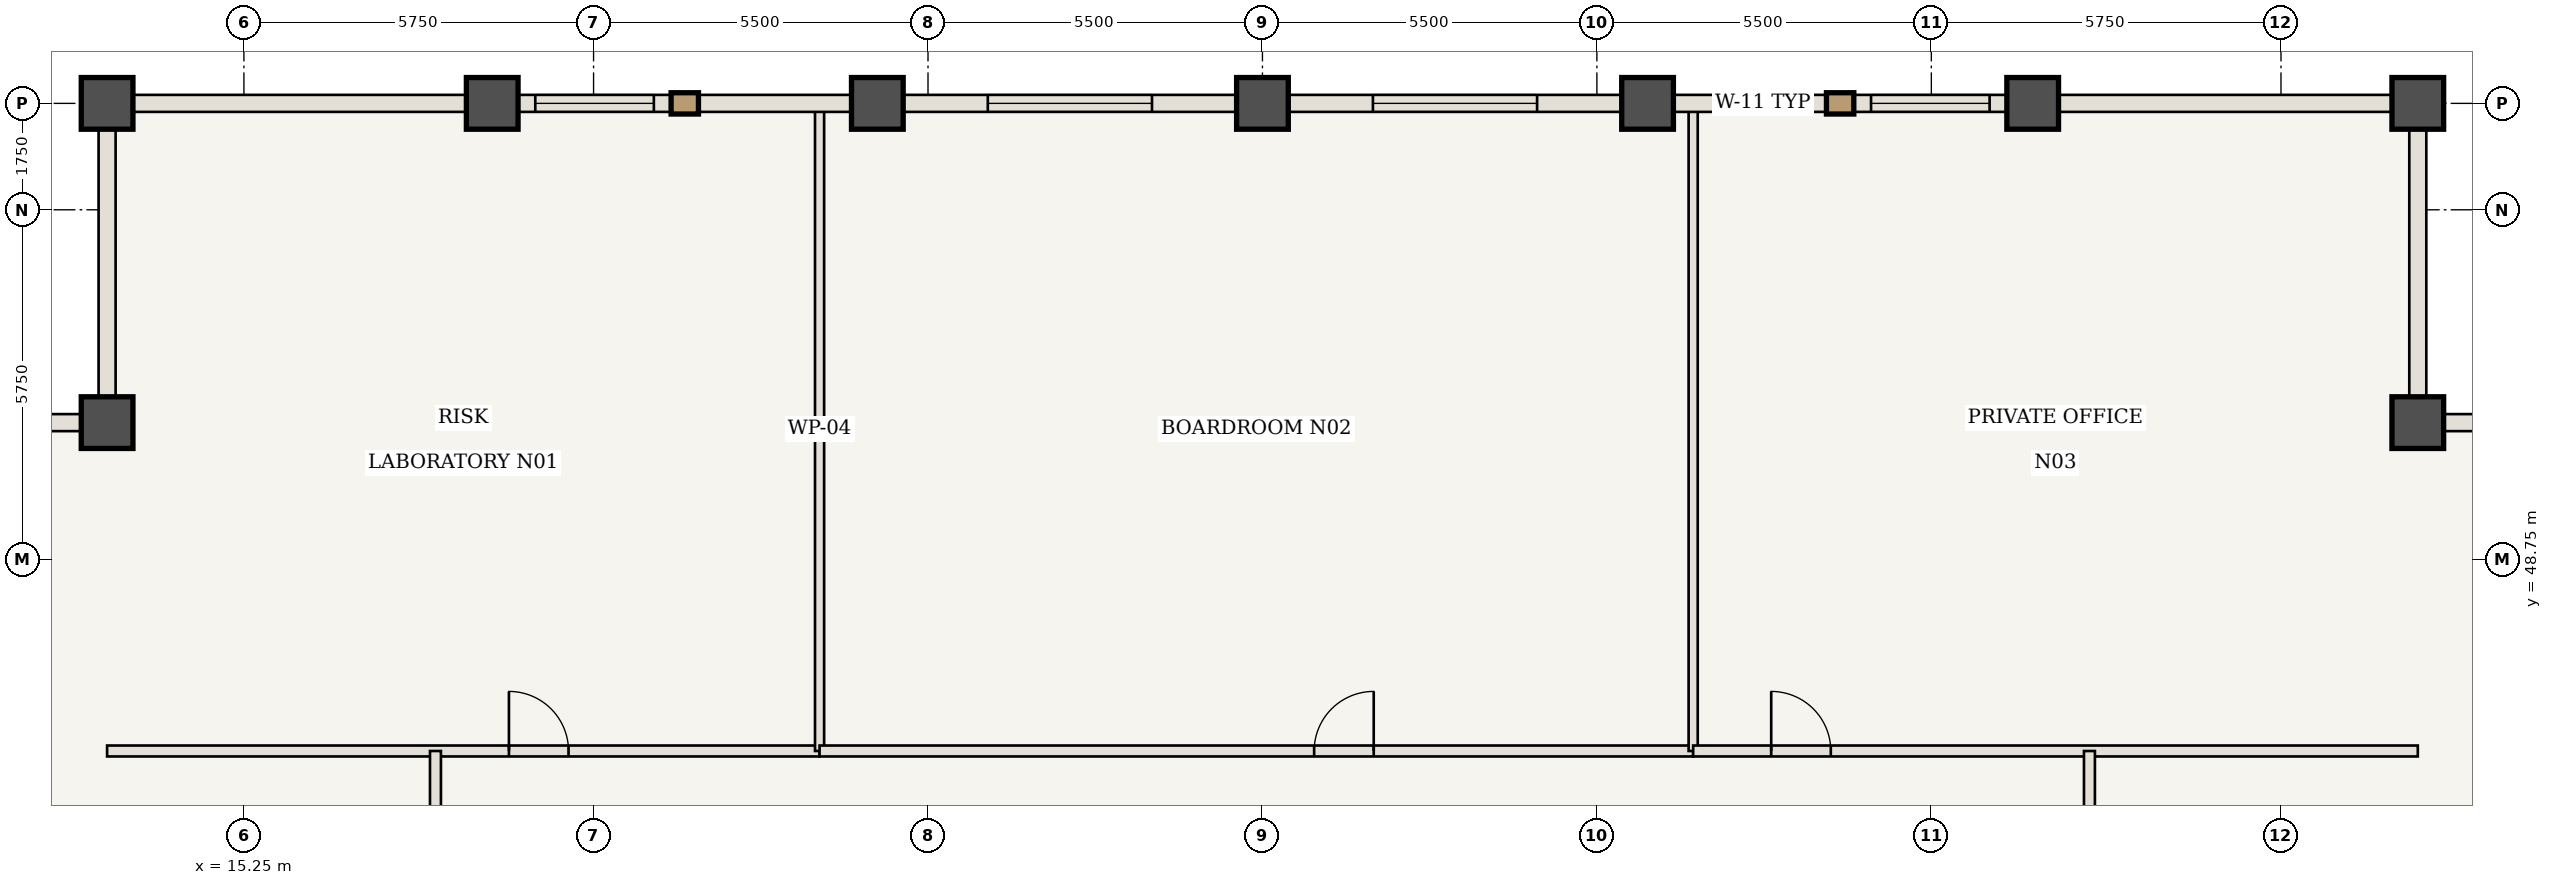
"""IFC4 building model, lengths in metres.
Left out: names, types, materials, properties, quantities, classifications, styles, units other than length and angle.
Written with IfcOpenShell. Run it as: python <this file> out.ifc"""

import sys

from ifc_helpers import new_model, si_unit, direction, frame, frame_2d, origin, origin_2d, place, context, subcontext, project, spatial, rectangle, extrude, element, fill, save


model = new_model("IFC4")
c1 = context("Model", 3, precision=1e-05, world=origin(), true_north=direction((0.0, 1.0)))
c2 = subcontext(c1, "Body", "Model", "MODEL_VIEW")
j1 = project(units=[si_unit("LENGTHUNIT", "METRE"), si_unit("PLANEANGLEUNIT", "RADIAN")], contexts=[c1])
p1 = place(None, origin())
s1 = spatial("IfcSite", under=j1, at=p1, CompositionType="ELEMENT")
p2 = place(p1, origin())
s2 = spatial("IfcBuilding", under=s1, at=p2, CompositionType="ELEMENT")
p3 = place(p2, frame((0.0, 0.0, 190.75)))
s3 = spatial("IfcBuildingStorey", under=s2, at=p3, CompositionType="ELEMENT", Elevation=190.75)
for number, where, z_axis, x_axis in (
    (1, (51.0, 51.0, 0.0), (0.0, 0.0, 1.0), (1.0, 0.0, 0.0)),
    (2, (51.0, 56.25, 0.0), (0.0, 0.0, 1.0), (1.0, 0.0, 0.0)),
    (3, (13.0, 56.25, 0.0), (0.0, 0.0, 1.0), (1.0, 0.0, 0.0)),
    (4, (13.0, 51.0, 0.0), (0.0, 0.0, 1.0), (1.0, 0.0, 0.0)),
    (5, (19.333, 56.25, 0.0), (0.0, 0.0, 1.0), (1.0, 0.0, 0.0)),
    (6, (25.667, 56.25, 0.0), (0.0, 0.0, 1.0), (1.0, 0.0, 0.0)),
    (7, (32.0, 56.25, 0.0), (0.0, 0.0, 1.0), (1.0, 0.0, 0.0)),
    (8, (38.333, 56.25, 0.0), (0.0, 0.0, 1.0), (1.0, 0.0, 0.0)),
    (9, (44.667, 56.25, 0.0), (0.0, 0.0, 1.0), (1.0, 0.0, 0.0)),
):
    element("IfcColumn", number, at=place(p3, frame(where, z_axis=z_axis, x_axis=x_axis)), inside=s3, PredefinedType="COLUMN", context=c2, shape_type="SweptSolid", body=[
        extrude(rectangle(XDim=0.85, YDim=0.85, at=origin_2d()), origin(), (0.0, 0.0, 1.0), 3.85),
    ])
p4 = place(p3, frame((13.0, 45.6, 0.0), z_axis=(0.0, 0.0, 1.0), x_axis=(1.0, 0.0, 0.0)))
e10 = element("IfcWall", 10, at=p4, inside=s3, PredefinedType="STANDARD", context=c2, shape_type="SweptSolid", body=[
    extrude(rectangle(XDim=11.717, YDim=0.18, at=frame_2d((5.858, 0.0))), origin(), (0.0, 0.0, 1.0), 3.685),
])
p5 = place(p4, frame((6.608, 0.0, 0.0)))
e11 = element("IfcOpeningElement", 11, at=p5, cuts=e10, PredefinedType="OPENING", context=c2, shape_type="SweptSolid", body=[
    extrude(rectangle(XDim=0.98, YDim=2.2, at=frame_2d((0.49, 1.1))), frame((0.0, 0.1, 0.0), z_axis=(0.0, -1.0, 0.0), x_axis=(1.0, 0.0, 0.0)), (0.0, 0.0, 1.0), 0.2),
])
p6 = place(p3, frame((24.717, 45.6, 0.0), z_axis=(0.0, 0.0, 1.0), x_axis=(0.0, 1.0, 0.0)))
e12 = element("IfcWall", 12, at=p6, inside=s3, PredefinedType="STANDARD", context=c2, shape_type="SweptSolid", body=[
    extrude(rectangle(XDim=10.59, YDim=0.15, at=frame_2d((5.295, 0.0))), origin(), (0.0, 0.0, 1.0), 3.685),
])
p7 = place(p3, frame((24.717, 45.6, 0.0), z_axis=(0.0, 0.0, 1.0), x_axis=(1.0, 0.0, 0.0)))
e13 = element("IfcWall", 13, at=p7, inside=s3, PredefinedType="STANDARD", context=c2, shape_type="SweptSolid", body=[
    extrude(rectangle(XDim=14.366, YDim=0.18, at=frame_2d((7.183, 0.0))), origin(), (0.0, 0.0, 1.0), 3.685),
])
p8 = place(p7, frame((8.133, 0.0, 0.0)))
e14 = element("IfcOpeningElement", 14, at=p8, cuts=e13, PredefinedType="OPENING", context=c2, shape_type="SweptSolid", body=[
    extrude(rectangle(XDim=0.98, YDim=2.2, at=frame_2d((0.49, 1.1))), frame((0.0, 0.1, 0.0), z_axis=(0.0, -1.0, 0.0), x_axis=(1.0, 0.0, 0.0)), (0.0, 0.0, 1.0), 0.2),
])
p9 = place(p3, frame((39.083, 45.6, 0.0), z_axis=(0.0, 0.0, 1.0), x_axis=(0.0, 1.0, 0.0)))
e15 = element("IfcWall", 15, at=p9, inside=s3, PredefinedType="STANDARD", context=c2, shape_type="SweptSolid", body=[
    extrude(rectangle(XDim=10.59, YDim=0.15, at=frame_2d((5.295, 0.0))), origin(), (0.0, 0.0, 1.0), 3.685),
])
p10 = place(p3, frame((39.083, 45.6, 0.0), z_axis=(0.0, 0.0, 1.0), x_axis=(1.0, 0.0, 0.0)))
e16 = element("IfcWall", 16, at=p10, inside=s3, PredefinedType="STANDARD", context=c2, shape_type="SweptSolid", body=[
    extrude(rectangle(XDim=11.917, YDim=0.18, at=frame_2d((5.958, 0.0))), origin(), (0.0, 0.0, 1.0), 3.685),
])
p11 = place(p10, frame((1.283, 0.0, 0.0)))
e17 = element("IfcOpeningElement", 17, at=p11, cuts=e16, PredefinedType="OPENING", context=c2, shape_type="SweptSolid", body=[
    extrude(rectangle(XDim=0.98, YDim=2.2, at=frame_2d((0.49, 1.1))), frame((0.0, 0.1, 0.0), z_axis=(0.0, -1.0, 0.0), x_axis=(1.0, 0.0, 0.0)), (0.0, 0.0, 1.0), 0.2),
])
p12 = place(p3, frame((18.4, 37.833, 0.0), z_axis=(0.0, 0.0, 1.0), x_axis=(0.0, 1.0, 0.0)))
e18 = element("IfcWall", 18, at=p12, inside=s3, PredefinedType="STANDARD", context=c2, shape_type="SweptSolid", body=[
    extrude(rectangle(XDim=7.767, YDim=0.18, at=frame_2d((3.883, 0.0))), origin(), (0.0, 0.0, 1.0), 3.685),
])
p13 = place(p12, frame((3.383, 0.0, 0.0)))
e19 = element("IfcOpeningElement", 19, at=p13, cuts=e18, PredefinedType="OPENING", context=c2, shape_type="SweptSolid", body=[
    extrude(rectangle(XDim=0.98, YDim=2.2, at=frame_2d((0.49, 1.1))), frame((0.0, 0.1, 0.0), z_axis=(0.0, -1.0, 0.0), x_axis=(1.0, 0.0, 0.0)), (0.0, 0.0, 1.0), 0.2),
])
p14 = place(p3, frame((45.6, 31.8, 0.0), z_axis=(0.0, 0.0, 1.0), x_axis=(0.0, 1.0, 0.0)))
e20 = element("IfcWall", 20, at=p14, inside=s3, PredefinedType="STANDARD", context=c2, shape_type="SweptSolid", body=[
    extrude(rectangle(XDim=13.8, YDim=0.18, at=frame_2d((6.9, 0.0))), origin(), (0.0, 0.0, 1.0), 3.685),
])
p15 = place(p14, frame((6.4, 0.0, 0.0)))
e21 = element("IfcOpeningElement", 21, at=p15, cuts=e20, PredefinedType="OPENING", context=c2, shape_type="SweptSolid", body=[
    extrude(rectangle(XDim=0.98, YDim=2.2, at=frame_2d((0.49, 1.1))), frame((0.0, 0.1, 0.0), z_axis=(0.0, -1.0, 0.0), x_axis=(1.0, 0.0, 0.0)), (0.0, 0.0, 1.0), 0.2),
])
p16 = place(p3, frame((13.0, 56.25, 0.0), z_axis=(0.0, 0.0, 1.0), x_axis=(1.0, 0.0, 0.0)))
e22 = element("IfcWall", 22, at=p16, inside=s3, PredefinedType="USERDEFINED", context=c2, shape_type="SweptSolid", body=[
    extrude(rectangle(XDim=6.333, YDim=0.28, at=frame_2d((3.167, 0.0))), origin(), (0.0, 0.0, 1.0), 2.985),
])
p17 = place(p3, frame((19.333, 56.25, 0.0), z_axis=(0.0, 0.0, 1.0), x_axis=(1.0, 0.0, 0.0)))
e23 = element("IfcWall", 23, at=p17, inside=s3, PredefinedType="USERDEFINED", context=c2, shape_type="SweptSolid", body=[
    extrude(rectangle(XDim=6.333, YDim=0.28, at=frame_2d((3.167, 0.0))), origin(), (0.0, 0.0, 1.0), 2.985),
])
p18 = place(p17, frame((0.708, 0.0, 0.85)))
e24 = element("IfcOpeningElement", 24, at=p18, cuts=e23, PredefinedType="OPENING", context=c2, shape_type="SweptSolid", body=[
    extrude(rectangle(XDim=1.95, YDim=1.935, at=frame_2d((0.975, 0.968))), frame((0.0, 0.15, 0.0), z_axis=(0.0, -1.0, 0.0), x_axis=(1.0, 0.0, 0.0)), (0.0, 0.0, 1.0), 0.3),
])
p19 = place(p3, frame((25.667, 56.25, 0.0), z_axis=(0.0, 0.0, 1.0), x_axis=(1.0, 0.0, 0.0)))
e25 = element("IfcWall", 25, at=p19, inside=s3, PredefinedType="USERDEFINED", context=c2, shape_type="SweptSolid", body=[
    extrude(rectangle(XDim=6.333, YDim=0.28, at=frame_2d((3.167, 0.0))), origin(), (0.0, 0.0, 1.0), 2.985),
])
p20 = place(p19, frame((1.817, 0.0, 0.85)))
e26 = element("IfcOpeningElement", 26, at=p20, cuts=e25, PredefinedType="OPENING", context=c2, shape_type="SweptSolid", body=[
    extrude(rectangle(XDim=2.7, YDim=1.935, at=frame_2d((1.35, 0.968))), frame((0.0, 0.15, 0.0), z_axis=(0.0, -1.0, 0.0), x_axis=(1.0, 0.0, 0.0)), (0.0, 0.0, 1.0), 0.3),
])
p21 = place(p3, frame((32.0, 56.25, 0.0), z_axis=(0.0, 0.0, 1.0), x_axis=(1.0, 0.0, 0.0)))
e27 = element("IfcWall", 27, at=p21, inside=s3, PredefinedType="USERDEFINED", context=c2, shape_type="SweptSolid", body=[
    extrude(rectangle(XDim=6.333, YDim=0.28, at=frame_2d((3.167, 0.0))), origin(), (0.0, 0.0, 1.0), 2.985),
])
p22 = place(p21, frame((1.817, 0.0, 0.85)))
e28 = element("IfcOpeningElement", 28, at=p22, cuts=e27, PredefinedType="OPENING", context=c2, shape_type="SweptSolid", body=[
    extrude(rectangle(XDim=2.7, YDim=1.935, at=frame_2d((1.35, 0.968))), frame((0.0, 0.15, 0.0), z_axis=(0.0, -1.0, 0.0), x_axis=(1.0, 0.0, 0.0)), (0.0, 0.0, 1.0), 0.3),
])
p23 = place(p3, frame((38.333, 56.25, 0.0), z_axis=(0.0, 0.0, 1.0), x_axis=(1.0, 0.0, 0.0)))
e29 = element("IfcWall", 29, at=p23, inside=s3, PredefinedType="USERDEFINED", context=c2, shape_type="SweptSolid", body=[
    extrude(rectangle(XDim=6.333, YDim=0.28, at=frame_2d((3.167, 0.0))), origin(), (0.0, 0.0, 1.0), 2.985),
])
p24 = place(p23, frame((1.096, 0.0, 0.85)))
e30 = element("IfcOpeningElement", 30, at=p24, cuts=e29, PredefinedType="OPENING", context=c2, shape_type="SweptSolid", body=[
    extrude(rectangle(XDim=1.6, YDim=1.935, at=frame_2d((0.8, 0.968))), frame((0.0, 0.15, 0.0), z_axis=(0.0, -1.0, 0.0), x_axis=(1.0, 0.0, 0.0)), (0.0, 0.0, 1.0), 0.3),
])
p25 = place(p23, frame((3.675, 0.0, 0.85)))
e31 = element("IfcOpeningElement", 31, at=p25, cuts=e29, PredefinedType="OPENING", context=c2, shape_type="SweptSolid", body=[
    extrude(rectangle(XDim=1.95, YDim=1.935, at=frame_2d((0.975, 0.968))), frame((0.0, 0.15, 0.0), z_axis=(0.0, -1.0, 0.0), x_axis=(1.0, 0.0, 0.0)), (0.0, 0.0, 1.0), 0.3),
])
p26 = place(p3, frame((44.667, 56.25, 0.0), z_axis=(0.0, 0.0, 1.0), x_axis=(1.0, 0.0, 0.0)))
e32 = element("IfcWall", 32, at=p26, inside=s3, PredefinedType="USERDEFINED", context=c2, shape_type="SweptSolid", body=[
    extrude(rectangle(XDim=6.333, YDim=0.28, at=frame_2d((3.167, 0.0))), origin(), (0.0, 0.0, 1.0), 2.985),
])
for number, where, z_axis, x_axis in (
    (33, (51.0, 51.0, 0.0), (0.0, 0.0, 1.0), (1.0, 0.0, 0.0)),
    (34, (51.0, 56.25, 0.0), (0.0, 0.0, 1.0), (0.0, -1.0, 0.0)),
    (35, (13.0, 51.0, 0.0), (0.0, 0.0, 1.0), (0.0, 1.0, 0.0)),
    (36, (7.75, 51.0, 0.0), (0.0, 0.0, 1.0), (1.0, 0.0, 0.0)),
):
    element("IfcWall", number, at=place(p3, frame(where, z_axis=z_axis, x_axis=x_axis)), inside=s3, PredefinedType="USERDEFINED", context=c2, shape_type="SweptSolid", body=[
        extrude(rectangle(XDim=5.25, YDim=0.28, at=frame_2d((2.625, 0.0))), origin(), (0.0, 0.0, 1.0), 2.985),
    ])
p27 = place(p5, origin())
e37 = element("IfcDoor", 37, at=p27, inside=s3, OperationType="SINGLE_SWING_LEFT", PredefinedType="DOOR", context=c2, shape_type="SweptSolid", body=[
    extrude(rectangle(XDim=0.98, YDim=2.2, at=frame_2d((0.49, 1.1))), frame((0.0, 0.025, 0.0), z_axis=(0.0, -1.0, 0.0), x_axis=(1.0, 0.0, 0.0)), (0.0, 0.0, 1.0), 0.05),
])
fill(e11, e37)
p28 = place(p8, origin())
e38 = element("IfcDoor", 38, at=p28, inside=s3, OperationType="SINGLE_SWING_RIGHT", PredefinedType="DOOR", context=c2, shape_type="SweptSolid", body=[
    extrude(rectangle(XDim=0.98, YDim=2.2, at=frame_2d((0.49, 1.1))), frame((0.0, 0.025, 0.0), z_axis=(0.0, -1.0, 0.0), x_axis=(1.0, 0.0, 0.0)), (0.0, 0.0, 1.0), 0.05),
])
fill(e14, e38)
p29 = place(p11, origin())
e39 = element("IfcDoor", 39, at=p29, inside=s3, OperationType="SINGLE_SWING_LEFT", PredefinedType="DOOR", context=c2, shape_type="SweptSolid", body=[
    extrude(rectangle(XDim=0.98, YDim=2.2, at=frame_2d((0.49, 1.1))), frame((0.0, 0.025, 0.0), z_axis=(0.0, -1.0, 0.0), x_axis=(1.0, 0.0, 0.0)), (0.0, 0.0, 1.0), 0.05),
])
fill(e17, e39)
p30 = place(p18, origin())
e40 = element("IfcWindow", 40, at=p30, inside=s3, PartitioningType="SINGLE_PANEL", PredefinedType="WINDOW", context=c2, shape_type="SweptSolid", body=[
    extrude(rectangle(XDim=1.95, YDim=1.935, at=frame_2d((0.975, 0.968))), frame((0.0, 0.03, 0.0), z_axis=(0.0, -1.0, 0.0), x_axis=(1.0, 0.0, 0.0)), (0.0, 0.0, 1.0), 0.06),
])
fill(e24, e40)
p31 = place(p20, origin())
e41 = element("IfcWindow", 41, at=p31, inside=s3, PartitioningType="SINGLE_PANEL", PredefinedType="WINDOW", context=c2, shape_type="SweptSolid", body=[
    extrude(rectangle(XDim=2.7, YDim=1.935, at=frame_2d((1.35, 0.968))), frame((0.0, 0.03, 0.0), z_axis=(0.0, -1.0, 0.0), x_axis=(1.0, 0.0, 0.0)), (0.0, 0.0, 1.0), 0.06),
])
fill(e26, e41)
p32 = place(p22, origin())
e42 = element("IfcWindow", 42, at=p32, inside=s3, PartitioningType="SINGLE_PANEL", PredefinedType="WINDOW", context=c2, shape_type="SweptSolid", body=[
    extrude(rectangle(XDim=2.7, YDim=1.935, at=frame_2d((1.35, 0.968))), frame((0.0, 0.03, 0.0), z_axis=(0.0, -1.0, 0.0), x_axis=(1.0, 0.0, 0.0)), (0.0, 0.0, 1.0), 0.06),
])
fill(e28, e42)
p33 = place(p24, origin())
e43 = element("IfcWindow", 43, at=p33, inside=s3, PartitioningType="SINGLE_PANEL", PredefinedType="WINDOW", context=c2, shape_type="SweptSolid", body=[
    extrude(rectangle(XDim=1.6, YDim=1.935, at=frame_2d((0.8, 0.968))), frame((0.0, 0.03, 0.0), z_axis=(0.0, -1.0, 0.0), x_axis=(1.0, 0.0, 0.0)), (0.0, 0.0, 1.0), 0.06),
])
fill(e30, e43)
p34 = place(p25, origin())
e44 = element("IfcWindow", 44, at=p34, inside=s3, PartitioningType="SINGLE_PANEL", PredefinedType="WINDOW", context=c2, shape_type="SweptSolid", body=[
    extrude(rectangle(XDim=1.95, YDim=1.935, at=frame_2d((0.975, 0.968))), frame((0.0, 0.03, 0.0), z_axis=(0.0, -1.0, 0.0), x_axis=(1.0, 0.0, 0.0)), (0.0, 0.0, 1.0), 0.06),
])
fill(e31, e44)
save(model, sys.argv[1])
